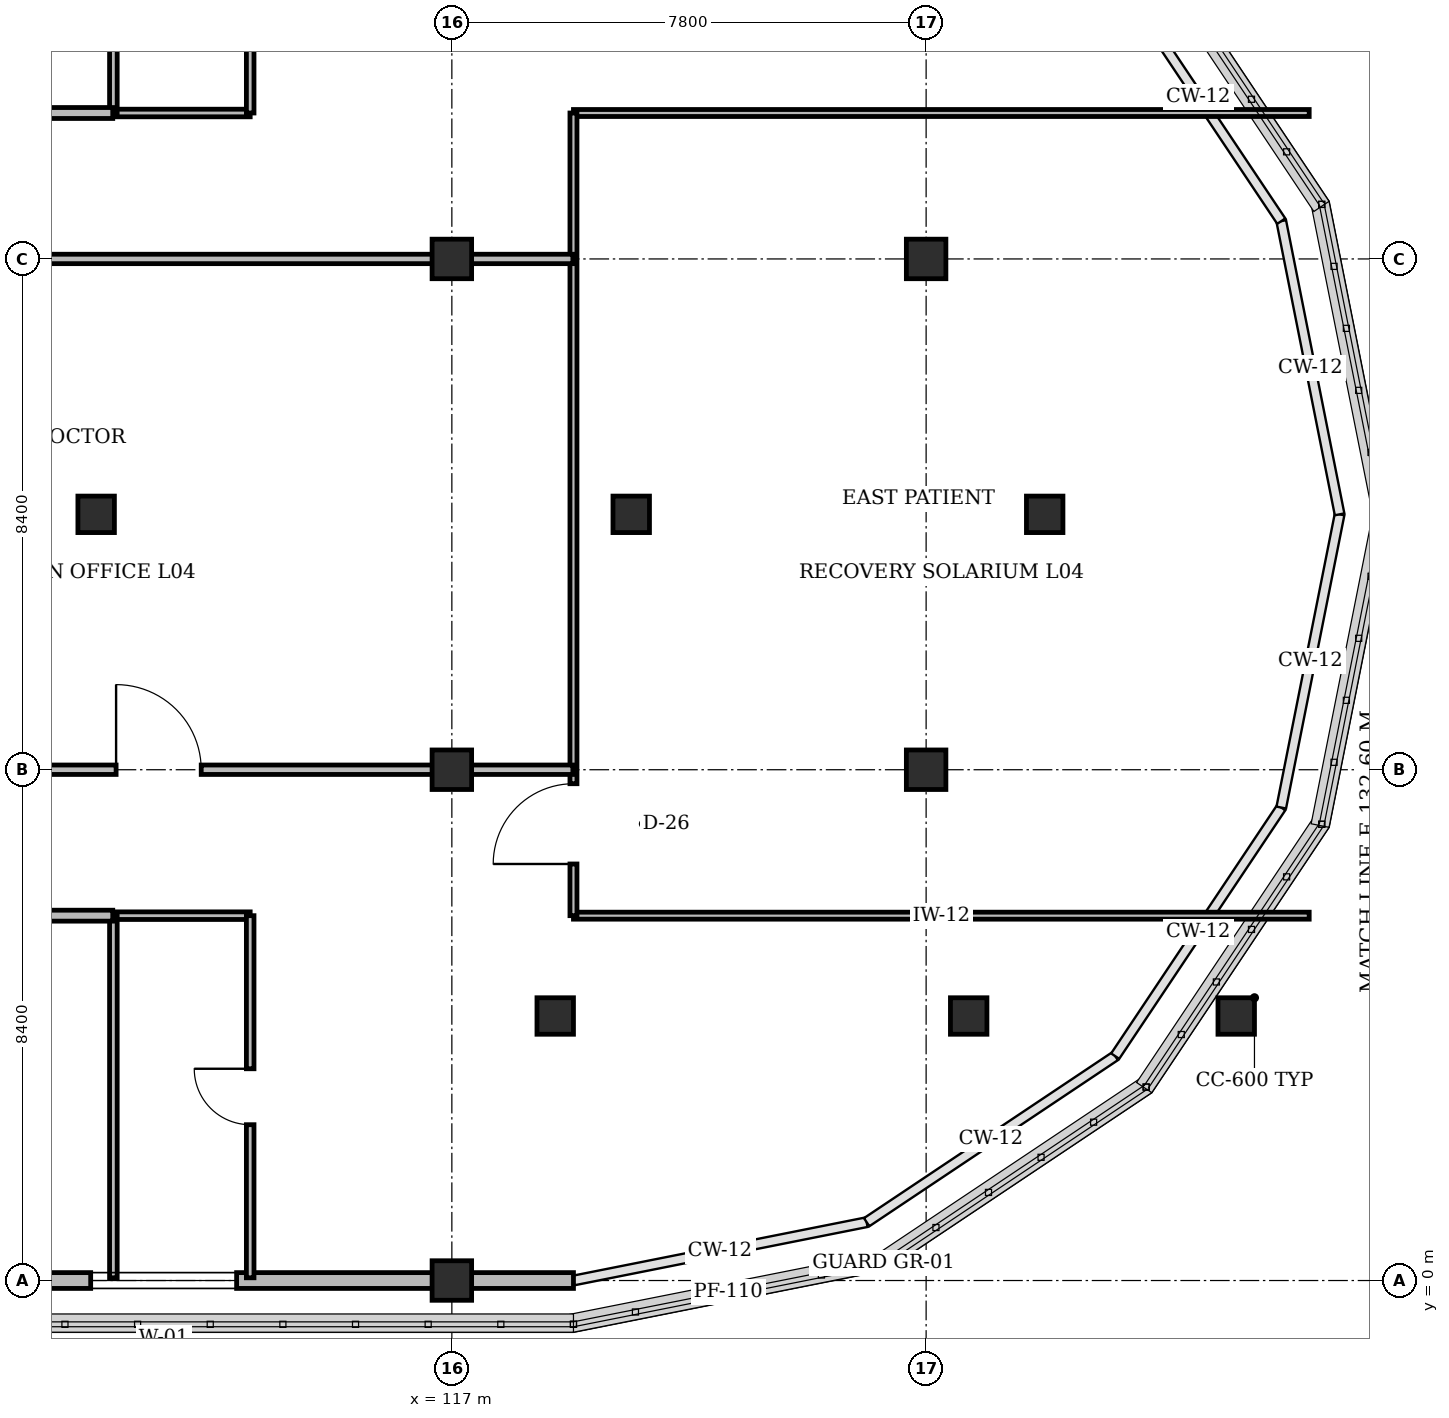
"""IFC4 building model, lengths in metres.
Left out: names, types, materials, properties, quantities, classifications, styles, units other than length and angle.
Written with IfcOpenShell. Run it as: python <this file> out.ifc"""

import sys

from ifc_helpers import new_model, si_unit, direction, frame, frame_2d, origin, origin_2d, place, context, subcontext, project, spatial, rectangle, circle, extrude, element, fill, save


model = new_model("IFC4")
c1 = context("Model", 3, precision=1e-05, world=origin(), true_north=direction((0.0, 1.0)))
c2 = subcontext(c1, "Body", "Model", "MODEL_VIEW")
j1 = project(units=[si_unit("LENGTHUNIT", "METRE"), si_unit("PLANEANGLEUNIT", "RADIAN")], contexts=[c1])
p1 = place(None, origin())
s1 = spatial("IfcSite", under=j1, at=p1, CompositionType="ELEMENT")
p2 = place(p1, origin())
s2 = spatial("IfcBuilding", under=s1, at=p2, CompositionType="ELEMENT")
p3 = place(p2, frame((0.0, 0.0, 18.0)))
s3 = spatial("IfcBuildingStorey", under=s2, at=p3, CompositionType="ELEMENT", Elevation=18.0)
for number, where, z_axis, x_axis in (
    (1, (117.0, 0.0, 0.0), (0.0, 0.0, 1.0), (1.0, 0.0, 0.0)),
    (2, (117.0, 8.4, 0.0), (0.0, 0.0, 1.0), (1.0, 0.0, 0.0)),
    (3, (117.0, 16.8, 0.0), (0.0, 0.0, 1.0), (1.0, 0.0, 0.0)),
    (4, (124.8, 8.4, 0.0), (0.0, 0.0, 1.0), (1.0, 0.0, 0.0)),
    (5, (124.8, 16.8, 0.0), (0.0, 0.0, 1.0), (1.0, 0.0, 0.0)),
):
    element("IfcColumn", number, at=place(p3, frame(where, z_axis=z_axis, x_axis=x_axis)), inside=s3, PredefinedType="COLUMN", context=c2, shape_type="SweptSolid", body=[
        extrude(rectangle(XDim=0.65, YDim=0.65, at=origin_2d()), origin(), (0.0, 0.0, 1.0), 4.2),
    ])
for number, where, z_axis, x_axis in (
    (6, (129.9, 4.35, 0.0), (0.0, 0.0, 1.0), (1.0, 0.0, 0.0)),
    (7, (126.75, 12.6, 0.0), (0.0, 0.0, 1.0), (1.0, 0.0, 0.0)),
    (8, (125.5, 4.35, 0.0), (0.0, 0.0, 1.0), (1.0, 0.0, 0.0)),
    (9, (119.95, 12.6, 0.0), (0.0, 0.0, 1.0), (1.0, 0.0, 0.0)),
    (10, (118.7, 4.35, 0.0), (0.0, 0.0, 1.0), (1.0, 0.0, 0.0)),
    (11, (111.15, 12.6, 0.0), (0.0, 0.0, 1.0), (1.0, 0.0, 0.0)),
):
    element("IfcColumn", number, at=place(p3, frame(where, z_axis=z_axis, x_axis=x_axis)), inside=s3, PredefinedType="PILASTER", context=c2, shape_type="SweptSolid", body=[
        extrude(circle(Radius=0.3, at=origin_2d()), origin(), (0.0, 0.0, 1.0), 4.2),
    ])
p4 = place(p3, frame((119.0, 0.0, 0.0), z_axis=(0.0, 0.0, 1.0), x_axis=(-1.0, 0.0, 0.0)))
e12 = element("IfcWall", 12, at=p4, inside=s3, PredefinedType="STANDARD", context=c2, shape_type="SweptSolid", body=[
    extrude(rectangle(XDim=9.51, YDim=0.26, at=frame_2d((4.755, 0.0))), origin(), (0.0, 0.0, 1.0), 2.805),
])
p5 = place(p4, frame((5.54, 0.0, 0.85)))
e13 = element("IfcOpeningElement", 13, at=p5, cuts=e12, PredefinedType="OPENING", context=c2, shape_type="SweptSolid", body=[
    extrude(rectangle(XDim=2.4, YDim=1.5, at=frame_2d((1.2, 0.75))), frame((0.0, 0.14, 0.0), z_axis=(0.0, -1.0, 0.0), x_axis=(1.0, 0.0, 0.0)), (0.0, 0.0, 1.0), 0.28),
])
p6 = place(p3, frame((111.433, 6.0, 0.0), z_axis=(0.0, 0.0, 1.0), x_axis=(1.0, 0.0, 0.0)))
e14 = element("IfcWall", 14, at=p6, inside=s3, PredefinedType="PARTITIONING", context=c2, shape_type="SweptSolid", body=[
    extrude(rectangle(XDim=2.25, YDim=0.125, at=frame_2d((1.125, 0.0))), origin(), (0.0, 0.0, 1.0), 3.9),
])
p7 = place(p3, frame((111.433, 0.045, 0.0), z_axis=(0.0, 0.0, 1.0), x_axis=(0.0, 1.0, 0.0)))
e15 = element("IfcWall", 15, at=p7, inside=s3, PredefinedType="PARTITIONING", context=c2, shape_type="SweptSolid", body=[
    extrude(rectangle(XDim=5.955, YDim=0.125, at=frame_2d((2.978, 0.0))), origin(), (0.0, 0.0, 1.0), 3.9),
])
p8 = place(p3, frame((113.683, 0.045, 0.0), z_axis=(0.0, 0.0, 1.0), x_axis=(0.0, 1.0, 0.0)))
e16 = element("IfcWall", 16, at=p8, inside=s3, PredefinedType="PARTITIONING", context=c2, shape_type="SweptSolid", body=[
    extrude(rectangle(XDim=5.955, YDim=0.125, at=frame_2d((2.978, 0.0))), origin(), (0.0, 0.0, 1.0), 3.9),
])
p9 = place(p8, frame((2.518, 0.0, 0.0)))
e17 = element("IfcOpeningElement", 17, at=p9, cuts=e16, PredefinedType="OPENING", context=c2, shape_type="SweptSolid", body=[
    extrude(rectangle(XDim=0.92, YDim=2.1, at=frame_2d((0.46, 1.05))), frame((0.0, 0.073, 0.0), z_axis=(0.0, -1.0, 0.0), x_axis=(1.0, 0.0, 0.0)), (0.0, 0.0, 1.0), 0.145),
])
p10 = place(p3, frame((111.433, 19.2, 0.0), z_axis=(0.0, 0.0, 1.0), x_axis=(1.0, 0.0, 0.0)))
e18 = element("IfcWall", 18, at=p10, inside=s3, PredefinedType="PARTITIONING", context=c2, shape_type="SweptSolid", body=[
    extrude(rectangle(XDim=2.25, YDim=0.125, at=frame_2d((1.125, 0.0))), origin(), (0.0, 0.0, 1.0), 3.9),
])
p11 = place(p3, frame((111.433, 19.2, 0.0), z_axis=(0.0, 0.0, 1.0), x_axis=(0.0, 1.0, 0.0)))
e19 = element("IfcWall", 19, at=p11, inside=s3, PredefinedType="PARTITIONING", context=c2, shape_type="SweptSolid", body=[
    extrude(rectangle(XDim=5.955, YDim=0.125, at=frame_2d((2.978, 0.0))), origin(), (0.0, 0.0, 1.0), 3.9),
])
p12 = place(p3, frame((113.683, 19.2, 0.0), z_axis=(0.0, 0.0, 1.0), x_axis=(0.0, 1.0, 0.0)))
e20 = element("IfcWall", 20, at=p12, inside=s3, PredefinedType="PARTITIONING", context=c2, shape_type="SweptSolid", body=[
    extrude(rectangle(XDim=5.955, YDim=0.125, at=frame_2d((2.978, 0.0))), origin(), (0.0, 0.0, 1.0), 3.9),
])
p13 = place(p12, frame((2.518, 0.0, 0.0)))
e21 = element("IfcOpeningElement", 21, at=p13, cuts=e20, PredefinedType="OPENING", context=c2, shape_type="SweptSolid", body=[
    extrude(rectangle(XDim=0.92, YDim=2.1, at=frame_2d((0.46, 1.05))), frame((0.0, 0.073, 0.0), z_axis=(0.0, -1.0, 0.0), x_axis=(1.0, 0.0, 0.0)), (0.0, 0.0, 1.0), 0.145),
])
for number, where, z_axis, x_axis in (
    (22, (119.0, 6.0, 0.0), (0.0, 0.0, 1.0), (1.0, 0.0, 0.0)),
    (23, (119.0, 19.2, 0.0), (0.0, 0.0, 1.0), (1.0, 0.0, 0.0)),
):
    element("IfcWall", number, at=place(p3, frame(where, z_axis=z_axis, x_axis=x_axis)), inside=s3, PredefinedType="PARTITIONING", context=c2, shape_type="SweptSolid", body=[
        extrude(rectangle(XDim=12.1, YDim=0.115, at=frame_2d((6.05, 0.0))), origin(), (0.0, 0.0, 1.0), 3.9),
    ])
p14 = place(p3, frame((119.0, 6.0, 0.0), z_axis=(0.0, 0.0, 1.0), x_axis=(0.0, 1.0, 0.0)))
e24 = element("IfcWall", 24, at=p14, inside=s3, PredefinedType="PARTITIONING", context=c2, shape_type="SweptSolid", body=[
    extrude(rectangle(XDim=13.2, YDim=0.115, at=frame_2d((6.6, 0.0))), origin(), (0.0, 0.0, 1.0), 3.9),
])
p15 = place(p14, frame((0.85, 0.0, 0.0)))
e25 = element("IfcOpeningElement", 25, at=p15, cuts=e24, PredefinedType="OPENING", context=c2, shape_type="SweptSolid", body=[
    extrude(rectangle(XDim=1.32, YDim=2.15, at=frame_2d((0.66, 1.075))), frame((0.0, 0.067, 0.0), z_axis=(0.0, -1.0, 0.0), x_axis=(1.0, 0.0, 0.0)), (0.0, 0.0, 1.0), 0.135),
])
p16 = place(p3, frame((106.127, 6.0, 0.0), z_axis=(0.0, 0.0, 1.0), x_axis=(1.0, 0.0, 0.0)))
e26 = element("IfcWall", 26, at=p16, inside=s3, PredefinedType="PARTITIONING", context=c2, shape_type="SweptSolid", body=[
    extrude(rectangle(XDim=5.296, YDim=0.18, at=frame_2d((2.648, 0.0))), origin(), (0.0, 0.0, 1.0), 3.9),
])
p17 = place(p16, frame((1.848, 0.0, 0.0)))
e27 = element("IfcOpeningElement", 27, at=p17, cuts=e26, PredefinedType="OPENING", context=c2, shape_type="SweptSolid", body=[
    extrude(rectangle(XDim=1.6, YDim=2.25, at=frame_2d((0.8, 1.125))), frame((0.0, 0.1, 0.0), z_axis=(0.0, -1.0, 0.0), x_axis=(1.0, 0.0, 0.0)), (0.0, 0.0, 1.0), 0.2),
])
p18 = place(p3, frame((106.127, 19.2, 0.0), z_axis=(0.0, 0.0, 1.0), x_axis=(1.0, 0.0, 0.0)))
e28 = element("IfcWall", 28, at=p18, inside=s3, PredefinedType="PARTITIONING", context=c2, shape_type="SweptSolid", body=[
    extrude(rectangle(XDim=5.296, YDim=0.18, at=frame_2d((2.648, 0.0))), origin(), (0.0, 0.0, 1.0), 3.9),
])
p19 = place(p18, frame((1.848, 0.0, 0.0)))
e29 = element("IfcOpeningElement", 29, at=p19, cuts=e28, PredefinedType="OPENING", context=c2, shape_type="SweptSolid", body=[
    extrude(rectangle(XDim=1.6, YDim=2.25, at=frame_2d((0.8, 1.125))), frame((0.0, 0.1, 0.0), z_axis=(0.0, -1.0, 0.0), x_axis=(1.0, 0.0, 0.0)), (0.0, 0.0, 1.0), 0.2),
])
p20 = place(p3, frame((101.96, 8.4, 0.0), z_axis=(0.0, 0.0, 1.0), x_axis=(1.0, 0.0, 0.0)))
e30 = element("IfcWall", 30, at=p20, inside=s3, PredefinedType="PARTITIONING", context=c2, shape_type="SweptSolid", body=[
    extrude(rectangle(XDim=17.03, YDim=0.155, at=frame_2d((8.515, 0.0))), origin(), (0.0, 0.0, 1.0), 3.22),
])
p21 = place(p20, frame((9.518, 0.0, 0.0)))
e31 = element("IfcOpeningElement", 31, at=p21, cuts=e30, PredefinedType="OPENING", context=c2, shape_type="SweptSolid", body=[
    extrude(rectangle(XDim=1.4, YDim=2.2, at=frame_2d((0.7, 1.1))), frame((0.0, 0.087, 0.0), z_axis=(0.0, -1.0, 0.0), x_axis=(1.0, 0.0, 0.0)), (0.0, 0.0, 1.0), 0.175),
])
p22 = place(p3, frame((101.96, 16.8, 0.0), z_axis=(0.0, 0.0, 1.0), x_axis=(1.0, 0.0, 0.0)))
e32 = element("IfcWall", 32, at=p22, inside=s3, PredefinedType="PARTITIONING", context=c2, shape_type="SweptSolid", body=[
    extrude(rectangle(XDim=17.03, YDim=0.155, at=frame_2d((8.515, 0.0))), origin(), (0.0, 0.0, 1.0), 3.22),
])
p23 = place(p5, origin())
e33 = element("IfcWindow", 33, at=p23, inside=s3, PartitioningType="SINGLE_PANEL", PredefinedType="WINDOW", context=c2, shape_type="SweptSolid", body=[
    extrude(rectangle(XDim=2.4, YDim=1.5, at=frame_2d((1.2, 0.75))), frame((0.0, 0.03, 0.0), z_axis=(0.0, -1.0, 0.0), x_axis=(1.0, 0.0, 0.0)), (0.0, 0.0, 1.0), 0.06),
])
fill(e13, e33)
p24 = place(p9, origin())
e34 = element("IfcDoor", 34, at=p24, inside=s3, OperationType="SINGLE_SWING_RIGHT", PredefinedType="DOOR", context=c2, shape_type="SweptSolid", body=[
    extrude(rectangle(XDim=0.92, YDim=2.1, at=frame_2d((0.46, 1.05))), frame((0.0, 0.025, 0.0), z_axis=(0.0, -1.0, 0.0), x_axis=(1.0, 0.0, 0.0)), (0.0, 0.0, 1.0), 0.05),
])
fill(e17, e34)
p25 = place(p15, origin())
e35 = element("IfcDoor", 35, at=p25, inside=s3, OperationType="SINGLE_SWING_LEFT", PredefinedType="DOOR", context=c2, shape_type="SweptSolid", body=[
    extrude(rectangle(XDim=1.32, YDim=2.15, at=frame_2d((0.66, 1.075))), frame((0.0, 0.025, 0.0), z_axis=(0.0, -1.0, 0.0), x_axis=(1.0, 0.0, 0.0)), (0.0, 0.0, 1.0), 0.05),
])
fill(e25, e35)
p26 = place(p21, origin())
e36 = element("IfcDoor", 36, at=p26, inside=s3, OperationType="SINGLE_SWING_LEFT", PredefinedType="DOOR", context=c2, shape_type="SweptSolid", body=[
    extrude(rectangle(XDim=1.4, YDim=2.2, at=frame_2d((0.7, 1.1))), frame((0.0, 0.025, 0.0), z_axis=(0.0, -1.0, 0.0), x_axis=(1.0, 0.0, 0.0)), (0.0, 0.0, 1.0), 0.05),
])
fill(e31, e36)
save(model, sys.argv[1])
